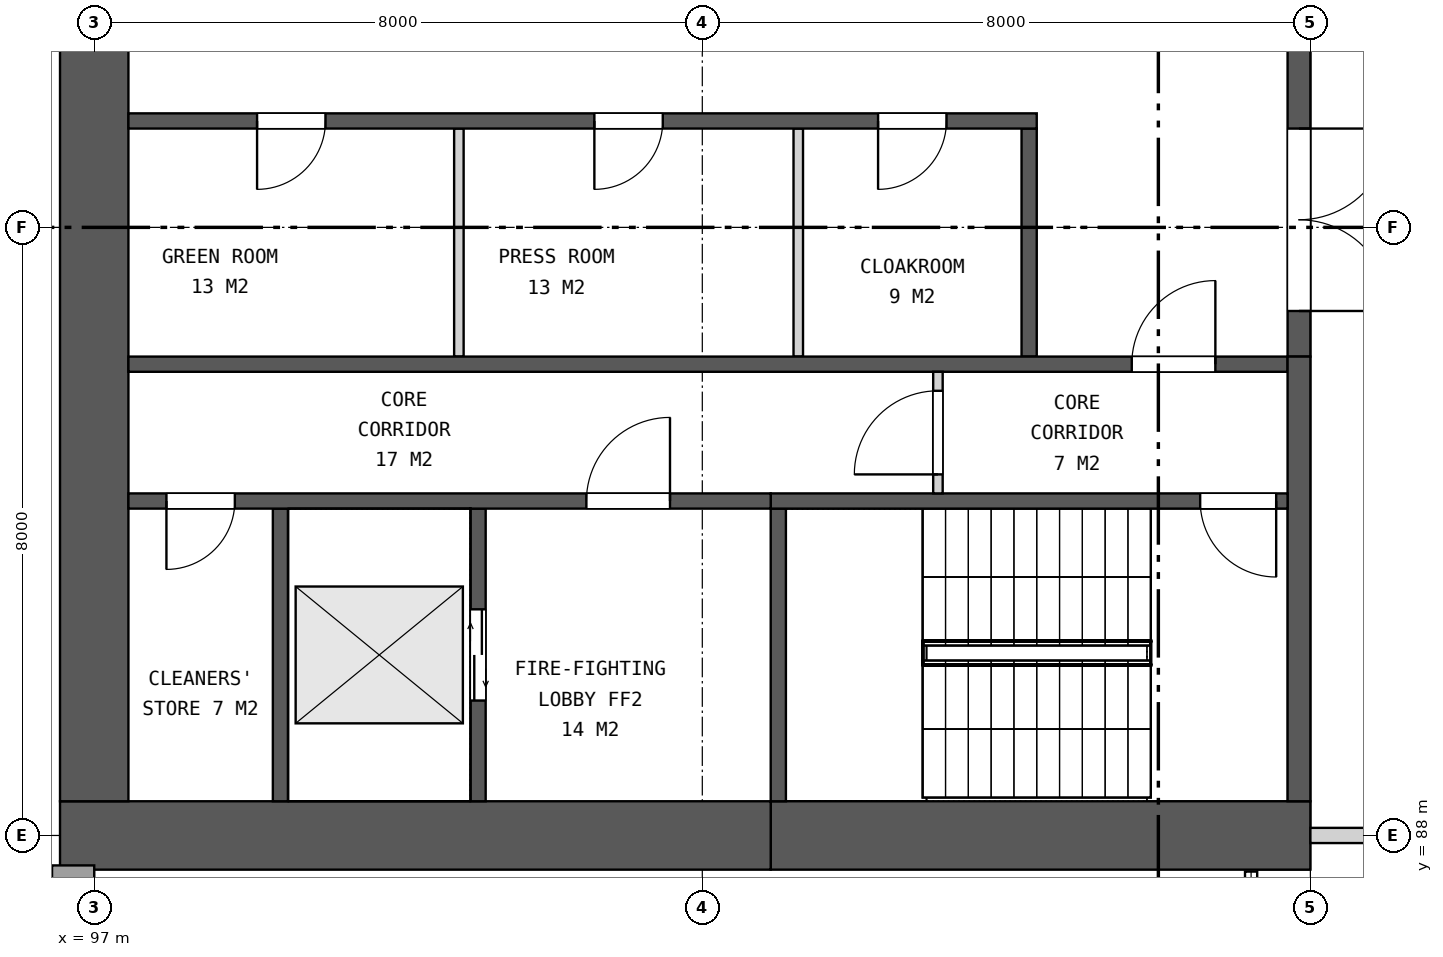
"""IFC4 building model, lengths in metres.
Left out: names, types, materials, properties, quantities, classifications, styles, units other than length and angle.
Written with IfcOpenShell. Run it as: python <this file> out.ifc"""

import sys

from ifc_helpers import new_model, si_unit, direction, frame, frame_2d, origin, place, context, subcontext, project, spatial, rectangle, extrude, element, fill, save


model = new_model("IFC4")
c1 = context("Model", 3, precision=1e-05, world=origin(), true_north=direction((0.0, 1.0)))
c2 = subcontext(c1, "Body", "Model", "MODEL_VIEW")
j1 = project(units=[si_unit("LENGTHUNIT", "METRE"), si_unit("PLANEANGLEUNIT", "RADIAN")], contexts=[c1])
p1 = place(None, origin())
s1 = spatial("IfcSite", under=j1, at=p1, CompositionType="ELEMENT")
p2 = place(p1, origin())
s2 = spatial("IfcBuilding", under=s1, at=p2, CompositionType="ELEMENT")
p3 = place(p2, frame((0.0, 0.0, 34.0)))
s3 = spatial("IfcBuildingStorey", under=s2, at=p3, CompositionType="ELEMENT", Elevation=34.0)
p4 = place(p3, frame((113.0, 88.0, 0.0), z_axis=(0.0, 0.0, 1.0), x_axis=(-1.0, 0.0, 0.0)))
e1 = element("IfcWall", 1, at=p4, inside=s3, PredefinedType="SHEAR", context=c2, shape_type="SweptSolid", body=[
    extrude(rectangle(XDim=7.1, YDim=0.9, at=frame_2d((3.55, 0.0))), origin(), (0.0, 0.0, 1.0), 7.5),
])
p5 = place(p3, frame((105.9, 88.0, 0.0), z_axis=(0.0, 0.0, 1.0), x_axis=(-1.0, 0.0, 0.0)))
e2 = element("IfcWall", 2, at=p5, inside=s3, PredefinedType="SHEAR", context=c2, shape_type="SweptSolid", body=[
    extrude(rectangle(XDim=9.35, YDim=0.9, at=frame_2d((4.675, 0.0))), origin(), (0.0, 0.0, 1.0), 7.5),
])
p6 = place(p3, frame((97.0, 111.55, 0.0), z_axis=(0.0, 0.0, 1.0), x_axis=(0.0, -1.0, 0.0)))
e3 = element("IfcWall", 3, at=p6, inside=s3, PredefinedType="SHEAR", context=c2, shape_type="SweptSolid", body=[
    extrude(rectangle(XDim=23.1, YDim=0.9, at=frame_2d((11.55, 0.0))), origin(), (0.0, 0.0, 1.0), 7.5),
])
p7 = place(p6, frame((10.35, 0.0, 0.0)))
e4 = element("IfcOpeningElement", 4, at=p7, cuts=e3, PredefinedType="OPENING", context=c2, shape_type="SweptSolid", body=[
    extrude(rectangle(XDim=2.4, YDim=2.4, at=frame_2d((1.2, 1.2))), frame((0.0, 0.46, 0.0), z_axis=(0.0, -1.0, 0.0), x_axis=(1.0, 0.0, 0.0)), (0.0, 0.0, 1.0), 0.92),
])
p8 = place(p3, frame((112.85, 105.7, 0.0), z_axis=(0.0, 0.0, 1.0), x_axis=(0.0, -1.0, 0.0)))
e5 = element("IfcWall", 5, at=p8, inside=s3, PredefinedType="SHEAR", context=c2, shape_type="SweptSolid", body=[
    extrude(rectangle(XDim=11.4, YDim=0.3, at=frame_2d((5.7, 0.0))), origin(), (0.0, 0.0, 1.0), 7.5),
])
p9 = place(p8, frame((0.6, 0.0, 0.0)))
e6 = element("IfcOpeningElement", 6, at=p9, cuts=e5, PredefinedType="OPENING", context=c2, shape_type="SweptSolid", body=[
    extrude(rectangle(XDim=2.4, YDim=2.4, at=frame_2d((1.2, 1.2))), frame((0.0, 0.16, 0.0), z_axis=(0.0, -1.0, 0.0), x_axis=(1.0, 0.0, 0.0)), (0.0, 0.0, 1.0), 0.32),
])
p10 = place(p8, frame((4.5, 0.0, 0.0)))
e7 = element("IfcOpeningElement", 7, at=p10, cuts=e5, PredefinedType="OPENING", context=c2, shape_type="SweptSolid", body=[
    extrude(rectangle(XDim=2.4, YDim=2.4, at=frame_2d((1.2, 1.2))), frame((0.0, 0.16, 0.0), z_axis=(0.0, -1.0, 0.0), x_axis=(1.0, 0.0, 0.0)), (0.0, 0.0, 1.0), 0.32),
])
p11 = place(p8, frame((8.4, 0.0, 0.0)))
e8 = element("IfcOpeningElement", 8, at=p11, cuts=e5, PredefinedType="OPENING", context=c2, shape_type="SweptSolid", body=[
    extrude(rectangle(XDim=2.4, YDim=2.4, at=frame_2d((1.2, 1.2))), frame((0.0, 0.16, 0.0), z_axis=(0.0, -1.0, 0.0), x_axis=(1.0, 0.0, 0.0)), (0.0, 0.0, 1.0), 0.32),
])
p12 = place(p3, frame((109.3, 97.3, 0.0), z_axis=(0.0, 0.0, 1.0), x_axis=(0.0, -1.0, 0.0)))
e9 = element("IfcWall", 9, at=p12, inside=s3, PredefinedType="SHEAR", context=c2, shape_type="SweptSolid", body=[
    extrude(rectangle(XDim=3.0, YDim=0.2, at=frame_2d((1.5, 0.0))), origin(), (0.0, 0.0, 1.0), 7.5),
])
for number, where, z_axis, x_axis in (
    (10, (106.262, 97.3, 0.0), (0.0, 0.0, 1.0), (0.0, -1.0, 0.0)),
    (11, (101.798, 97.3, 0.0), (0.0, 0.0, 1.0), (0.0, -1.0, 0.0)),
):
    element("IfcWall", number, at=place(p3, frame(where, z_axis=z_axis, x_axis=x_axis)), inside=s3, PredefinedType="PARTITIONING", context=c2, shape_type="SweptSolid", body=[
        extrude(rectangle(XDim=3.0, YDim=0.125, at=frame_2d((1.5, 0.0))), origin(), (0.0, 0.0, 1.0), 7.5),
    ])
p13 = place(p3, frame((109.4, 97.4, 0.0), z_axis=(0.0, 0.0, 1.0), x_axis=(-1.0, 0.0, 0.0)))
e12 = element("IfcWall", 12, at=p13, inside=s3, PredefinedType="SHEAR", context=c2, shape_type="SweptSolid", body=[
    extrude(rectangle(XDim=11.95, YDim=0.2, at=frame_2d((5.975, 0.0))), origin(), (0.0, 0.0, 1.0), 7.5),
])
p14 = place(p13, frame((1.188, 0.0, 0.0)))
e13 = element("IfcOpeningElement", 13, at=p14, cuts=e12, PredefinedType="OPENING", context=c2, shape_type="SweptSolid", body=[
    extrude(rectangle(XDim=0.9, YDim=2.1, at=frame_2d((0.45, 1.05))), frame((0.0, 0.11, 0.0), z_axis=(0.0, -1.0, 0.0), x_axis=(1.0, 0.0, 0.0)), (0.0, 0.0, 1.0), 0.22),
])
p15 = place(p13, frame((4.92, 0.0, 0.0)))
e14 = element("IfcOpeningElement", 14, at=p15, cuts=e12, PredefinedType="OPENING", context=c2, shape_type="SweptSolid", body=[
    extrude(rectangle(XDim=0.9, YDim=2.1, at=frame_2d((0.45, 1.05))), frame((0.0, 0.11, 0.0), z_axis=(0.0, -1.0, 0.0), x_axis=(1.0, 0.0, 0.0)), (0.0, 0.0, 1.0), 0.22),
])
p16 = place(p13, frame((9.357, 0.0, 0.0)))
e15 = element("IfcOpeningElement", 15, at=p16, cuts=e12, PredefinedType="OPENING", context=c2, shape_type="SweptSolid", body=[
    extrude(rectangle(XDim=0.9, YDim=2.1, at=frame_2d((0.45, 1.05))), frame((0.0, 0.11, 0.0), z_axis=(0.0, -1.0, 0.0), x_axis=(1.0, 0.0, 0.0)), (0.0, 0.0, 1.0), 0.22),
])
p17 = place(p3, frame((112.7, 94.2, 0.0), z_axis=(0.0, 0.0, 1.0), x_axis=(-1.0, 0.0, 0.0)))
e16 = element("IfcWall", 16, at=p17, inside=s3, PredefinedType="SHEAR", context=c2, shape_type="SweptSolid", body=[
    extrude(rectangle(XDim=15.25, YDim=0.2, at=frame_2d((7.625, 0.0))), origin(), (0.0, 0.0, 1.0), 7.5),
])
p18 = place(p17, frame((0.95, 0.0, 0.0)))
e17 = element("IfcOpeningElement", 17, at=p18, cuts=e16, PredefinedType="OPENING", context=c2, shape_type="SweptSolid", body=[
    extrude(rectangle(XDim=1.1, YDim=2.1, at=frame_2d((0.55, 1.05))), frame((0.0, 0.11, 0.0), z_axis=(0.0, -1.0, 0.0), x_axis=(1.0, 0.0, 0.0)), (0.0, 0.0, 1.0), 0.22),
])
p19 = place(p3, frame((112.85, 94.3, 0.0), z_axis=(0.0, 0.0, 1.0), x_axis=(0.0, -1.0, 0.0)))
e18 = element("IfcWall", 18, at=p19, inside=s3, PredefinedType="SHEAR", context=c2, shape_type="SweptSolid", body=[
    extrude(rectangle(XDim=5.85, YDim=0.3, at=frame_2d((2.925, 0.0))), origin(), (0.0, 0.0, 1.0), 7.5),
])
p20 = place(p3, frame((106.0, 92.3, 0.0), z_axis=(0.0, 0.0, 1.0), x_axis=(0.0, -1.0, 0.0)))
e19 = element("IfcWall", 19, at=p20, inside=s3, PredefinedType="SHEAR", context=c2, shape_type="SweptSolid", body=[
    extrude(rectangle(XDim=3.85, YDim=0.2, at=frame_2d((1.925, 0.0))), origin(), (0.0, 0.0, 1.0), 7.5),
])
p21 = place(p3, frame((102.05, 92.3, 0.0), z_axis=(0.0, 0.0, 1.0), x_axis=(0.0, -1.0, 0.0)))
e20 = element("IfcWall", 20, at=p21, inside=s3, PredefinedType="SHEAR", context=c2, shape_type="SweptSolid", body=[
    extrude(rectangle(XDim=3.85, YDim=0.2, at=frame_2d((1.925, 0.0))), origin(), (0.0, 0.0, 1.0), 7.5),
])
p22 = place(p21, frame((1.325, 0.0, 0.0)))
e21 = element("IfcOpeningElement", 21, at=p22, cuts=e20, PredefinedType="OPENING", context=c2, shape_type="SweptSolid", body=[
    extrude(rectangle(XDim=1.2, YDim=2.1, at=frame_2d((0.6, 1.05))), frame((0.0, 0.11, 0.0), z_axis=(0.0, -1.0, 0.0), x_axis=(1.0, 0.0, 0.0)), (0.0, 0.0, 1.0), 0.22),
])
p23 = place(p3, frame((99.45, 92.3, 0.0), z_axis=(0.0, 0.0, 1.0), x_axis=(0.0, -1.0, 0.0)))
e22 = element("IfcWall", 22, at=p23, inside=s3, PredefinedType="SHEAR", context=c2, shape_type="SweptSolid", body=[
    extrude(rectangle(XDim=3.85, YDim=0.2, at=frame_2d((1.925, 0.0))), origin(), (0.0, 0.0, 1.0), 7.5),
])
p24 = place(p3, frame((112.7, 92.4, 0.0), z_axis=(0.0, 0.0, 1.0), x_axis=(-1.0, 0.0, 0.0)))
e23 = element("IfcWall", 23, at=p24, inside=s3, PredefinedType="SHEAR", context=c2, shape_type="SweptSolid", body=[
    extrude(rectangle(XDim=6.8, YDim=0.2, at=frame_2d((3.4, 0.0))), origin(), (0.0, 0.0, 1.0), 7.5),
])
p25 = place(p24, frame((0.15, 0.0, 0.0)))
e24 = element("IfcOpeningElement", 24, at=p25, cuts=e23, PredefinedType="OPENING", context=c2, shape_type="SweptSolid", body=[
    extrude(rectangle(XDim=1.0, YDim=2.1, at=frame_2d((0.5, 1.05))), frame((0.0, 0.11, 0.0), z_axis=(0.0, -1.0, 0.0), x_axis=(1.0, 0.0, 0.0)), (0.0, 0.0, 1.0), 0.22),
])
p26 = place(p3, frame((105.9, 92.4, 0.0), z_axis=(0.0, 0.0, 1.0), x_axis=(-1.0, 0.0, 0.0)))
e25 = element("IfcWall", 25, at=p26, inside=s3, PredefinedType="SHEAR", context=c2, shape_type="SweptSolid", body=[
    extrude(rectangle(XDim=8.45, YDim=0.2, at=frame_2d((4.225, 0.0))), origin(), (0.0, 0.0, 1.0), 7.5),
])
p27 = place(p26, frame((1.325, 0.0, 0.0)))
e26 = element("IfcOpeningElement", 26, at=p27, cuts=e25, PredefinedType="OPENING", context=c2, shape_type="SweptSolid", body=[
    extrude(rectangle(XDim=1.1, YDim=2.1, at=frame_2d((0.55, 1.05))), frame((0.0, 0.11, 0.0), z_axis=(0.0, -1.0, 0.0), x_axis=(1.0, 0.0, 0.0)), (0.0, 0.0, 1.0), 0.22),
])
p28 = place(p26, frame((7.05, 0.0, 0.0)))
e27 = element("IfcOpeningElement", 27, at=p28, cuts=e25, PredefinedType="OPENING", context=c2, shape_type="SweptSolid", body=[
    extrude(rectangle(XDim=0.9, YDim=2.1, at=frame_2d((0.45, 1.05))), frame((0.0, 0.11, 0.0), z_axis=(0.0, -1.0, 0.0), x_axis=(1.0, 0.0, 0.0)), (0.0, 0.0, 1.0), 0.22),
])
p29 = place(p3, frame((108.1, 94.1, 0.0), z_axis=(0.0, 0.0, 1.0), x_axis=(0.0, -1.0, 0.0)))
e28 = element("IfcWall", 28, at=p29, inside=s3, PredefinedType="PARTITIONING", context=c2, shape_type="SweptSolid", body=[
    extrude(rectangle(XDim=1.6, YDim=0.125, at=frame_2d((0.8, 0.0))), origin(), (0.0, 0.0, 1.0), 7.5),
])
p30 = place(p29, frame((0.25, 0.0, 0.0)))
e29 = element("IfcOpeningElement", 29, at=p30, cuts=e28, PredefinedType="OPENING", context=c2, shape_type="SweptSolid", body=[
    extrude(rectangle(XDim=1.1, YDim=2.1, at=frame_2d((0.55, 1.05))), frame((0.0, 0.073, 0.0), z_axis=(0.0, -1.0, 0.0), x_axis=(1.0, 0.0, 0.0)), (0.0, 0.0, 1.0), 0.145),
])
p31 = place(p3, frame((96.445, 87.453, 0.0), z_axis=(0.0, 0.0, 1.0), x_axis=(1.0, 0.0, 0.0)))
e30 = element("IfcWall", 30, at=p31, inside=s3, PredefinedType="SOLIDWALL", context=c2, shape_type="SweptSolid", body=[
    extrude(rectangle(XDim=0.555, YDim=0.306, at=frame_2d((0.277, 0.0))), origin(), (0.0, 0.0, 1.0), 7.1),
])
p32 = place(p3, frame((113.0, 88.0, 0.0), z_axis=(0.0, 0.0, 1.0), x_axis=(1.0, 0.0, 0.0)))
e31 = element("IfcWall", 31, at=p32, inside=s3, PredefinedType="PARTITIONING", context=c2, shape_type="SweptSolid", body=[
    extrude(rectangle(XDim=7.4, YDim=0.2, at=frame_2d((3.7, 0.0))), origin(), (0.0, 0.0, 1.0), 6.551),
])
p33 = place(p32, frame((2.8, 0.0, 0.0)))
e32 = element("IfcOpeningElement", 32, at=p33, cuts=e31, PredefinedType="OPENING", context=c2, shape_type="SweptSolid", body=[
    extrude(rectangle(XDim=2.4, YDim=2.4, at=frame_2d((1.2, 1.2))), frame((0.0, 0.11, 0.0), z_axis=(0.0, -1.0, 0.0), x_axis=(1.0, 0.0, 0.0)), (0.0, 0.0, 1.0), 0.22),
])
p34 = place(p11, origin())
e33 = element("IfcDoor", 33, at=p34, inside=s3, OperationType="DOUBLE_DOOR_SINGLE_SWING", PredefinedType="DOOR", context=c2, shape_type="SweptSolid", body=[
    extrude(rectangle(XDim=2.4, YDim=2.4, at=frame_2d((1.2, 1.2))), frame((0.0, 0.025, 0.0), z_axis=(0.0, -1.0, 0.0), x_axis=(1.0, 0.0, 0.0)), (0.0, 0.0, 1.0), 0.05),
])
fill(e8, e33)
p35 = place(p14, origin())
e34 = element("IfcDoor", 34, at=p35, inside=s3, OperationType="SINGLE_SWING_RIGHT", PredefinedType="DOOR", context=c2, shape_type="SweptSolid", body=[
    extrude(rectangle(XDim=0.9, YDim=2.1, at=frame_2d((0.45, 1.05))), frame((0.0, 0.025, 0.0), z_axis=(0.0, -1.0, 0.0), x_axis=(1.0, 0.0, 0.0)), (0.0, 0.0, 1.0), 0.05),
])
fill(e13, e34)
p36 = place(p15, origin())
e35 = element("IfcDoor", 35, at=p36, inside=s3, OperationType="SINGLE_SWING_RIGHT", PredefinedType="DOOR", context=c2, shape_type="SweptSolid", body=[
    extrude(rectangle(XDim=0.9, YDim=2.1, at=frame_2d((0.45, 1.05))), frame((0.0, 0.025, 0.0), z_axis=(0.0, -1.0, 0.0), x_axis=(1.0, 0.0, 0.0)), (0.0, 0.0, 1.0), 0.05),
])
fill(e14, e35)
p37 = place(p16, origin())
e36 = element("IfcDoor", 36, at=p37, inside=s3, OperationType="SINGLE_SWING_RIGHT", PredefinedType="DOOR", context=c2, shape_type="SweptSolid", body=[
    extrude(rectangle(XDim=0.9, YDim=2.1, at=frame_2d((0.45, 1.05))), frame((0.0, 0.025, 0.0), z_axis=(0.0, -1.0, 0.0), x_axis=(1.0, 0.0, 0.0)), (0.0, 0.0, 1.0), 0.05),
])
fill(e15, e36)
p38 = place(p18, frame((1.1, 0.0, 0.0), z_axis=(0.0, 0.0, 1.0), x_axis=(-1.0, 0.0, 0.0)))
e37 = element("IfcDoor", 37, at=p38, inside=s3, OperationType="SINGLE_SWING_RIGHT", PredefinedType="DOOR", context=c2, shape_type="SweptSolid", body=[
    extrude(rectangle(XDim=1.1, YDim=2.1, at=frame_2d((0.55, 1.05))), frame((0.0, 0.025, 0.0), z_axis=(0.0, -1.0, 0.0), x_axis=(1.0, 0.0, 0.0)), (0.0, 0.0, 1.0), 0.05),
])
fill(e17, e37)
p39 = place(p22, origin())
e38 = element("IfcDoor", 38, at=p39, inside=s3, OperationType="DOUBLE_DOOR_SLIDING", PredefinedType="DOOR", context=c2, shape_type="SweptSolid", body=[
    extrude(rectangle(XDim=1.2, YDim=2.1, at=frame_2d((0.6, 1.05))), frame((0.0, 0.025, 0.0), z_axis=(0.0, -1.0, 0.0), x_axis=(1.0, 0.0, 0.0)), (0.0, 0.0, 1.0), 0.05),
])
fill(e21, e38)
p40 = place(p25, origin())
e39 = element("IfcDoor", 39, at=p40, inside=s3, OperationType="SINGLE_SWING_LEFT", PredefinedType="DOOR", context=c2, shape_type="SweptSolid", body=[
    extrude(rectangle(XDim=1.0, YDim=2.1, at=frame_2d((0.5, 1.05))), frame((0.0, 0.025, 0.0), z_axis=(0.0, -1.0, 0.0), x_axis=(1.0, 0.0, 0.0)), (0.0, 0.0, 1.0), 0.05),
])
fill(e24, e39)
p41 = place(p27, frame((1.1, 0.0, 0.0), z_axis=(0.0, 0.0, 1.0), x_axis=(-1.0, 0.0, 0.0)))
e40 = element("IfcDoor", 40, at=p41, inside=s3, OperationType="SINGLE_SWING_RIGHT", PredefinedType="DOOR", context=c2, shape_type="SweptSolid", body=[
    extrude(rectangle(XDim=1.1, YDim=2.1, at=frame_2d((0.55, 1.05))), frame((0.0, 0.025, 0.0), z_axis=(0.0, -1.0, 0.0), x_axis=(1.0, 0.0, 0.0)), (0.0, 0.0, 1.0), 0.05),
])
fill(e26, e40)
p42 = place(p28, origin())
e41 = element("IfcDoor", 41, at=p42, inside=s3, OperationType="SINGLE_SWING_RIGHT", PredefinedType="DOOR", context=c2, shape_type="SweptSolid", body=[
    extrude(rectangle(XDim=0.9, YDim=2.1, at=frame_2d((0.45, 1.05))), frame((0.0, 0.025, 0.0), z_axis=(0.0, -1.0, 0.0), x_axis=(1.0, 0.0, 0.0)), (0.0, 0.0, 1.0), 0.05),
])
fill(e27, e41)
p43 = place(p30, frame((1.1, 0.0, 0.0), z_axis=(0.0, 0.0, 1.0), x_axis=(-1.0, 0.0, 0.0)))
e42 = element("IfcDoor", 42, at=p43, inside=s3, OperationType="SINGLE_SWING_LEFT", PredefinedType="DOOR", context=c2, shape_type="SweptSolid", body=[
    extrude(rectangle(XDim=1.1, YDim=2.1, at=frame_2d((0.55, 1.05))), frame((0.0, 0.025, 0.0), z_axis=(0.0, -1.0, 0.0), x_axis=(1.0, 0.0, 0.0)), (0.0, 0.0, 1.0), 0.05),
])
fill(e29, e42)
save(model, sys.argv[1])
